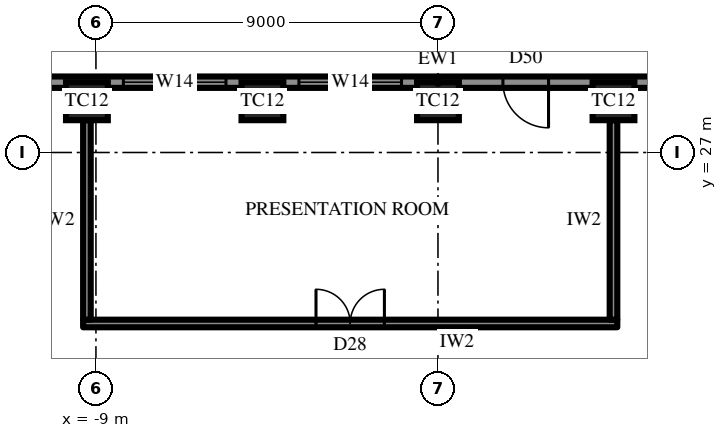
"""IFC4 building model, lengths in metres.
Left out: names, types, materials, properties, quantities, classifications, styles, units other than length and angle.
Written with IfcOpenShell. Run it as: python <this file> out.ifc"""

import sys

from ifc_helpers import new_model, si_unit, direction, frame, frame_2d, origin, origin_2d, place, context, subcontext, project, spatial, rectangle, extrude, element, fill, save


model = new_model("IFC4")
c1 = context("Model", 3, precision=1e-05, world=origin(), true_north=direction((0.0, 1.0)))
c2 = subcontext(c1, "Body", "Model", "MODEL_VIEW")
j1 = project(units=[si_unit("LENGTHUNIT", "METRE"), si_unit("PLANEANGLEUNIT", "RADIAN")], contexts=[c1])
p1 = place(None, origin())
s1 = spatial("IfcSite", under=j1, at=p1, CompositionType="ELEMENT")
p2 = place(p1, origin())
s2 = spatial("IfcBuilding", under=s1, at=p2, CompositionType="ELEMENT")
p3 = place(p2, frame((0.0, 0.0, 278.5)))
s3 = spatial("IfcBuildingStorey", under=s2, at=p3, CompositionType="ELEMENT", Elevation=278.5)
for number, where, z_axis, x_axis in (
    (1, (4.619, 28.35, 0.0), (0.0, 0.0, 1.0), (-1.0, 0.0, 0.0)),
    (2, (0.0, 28.35, 0.0), (0.0, 0.0, 1.0), (-1.0, 0.0, 0.0)),
    (3, (-4.619, 28.35, 0.0), (0.0, 0.0, 1.0), (-1.0, 0.0, 0.0)),
    (4, (-9.238, 28.35, 0.0), (0.0, 0.0, 1.0), (-1.0, 0.0, 0.0)),
):
    element("IfcColumn", number, at=place(p3, frame(where, z_axis=z_axis, x_axis=x_axis)), inside=s3, PredefinedType="COLUMN", context=c2, shape_type="SweptSolid", body=[
        extrude(rectangle(XDim=1.1, YDim=1.0, at=origin_2d()), origin(), (0.0, 0.0, 1.0), 4.2),
    ])
p4 = place(p3, frame((12.556, 28.85, 0.0), z_axis=(0.0, 0.0, 1.0), x_axis=(-1.0, 0.0, 0.0)))
e5 = element("IfcWall", 5, at=p4, inside=s3, PredefinedType="SOLIDWALL", context=c2, shape_type="SweptSolid", body=[
    extrude(rectangle(XDim=25.113, YDim=0.3, at=frame_2d((12.556, 0.0))), origin(), (0.0, 0.0, 1.0), 2.8),
])
p5 = place(p4, frame((4.278, 0.0, 0.6)))
e6 = element("IfcOpeningElement", 6, at=p5, cuts=e5, PredefinedType="OPENING", context=c2, shape_type="SweptSolid", body=[
    extrude(rectangle(XDim=2.7, YDim=1.95, at=frame_2d((1.35, 0.975))), frame((0.0, 0.16, 0.0), z_axis=(0.0, -1.0, 0.0), x_axis=(1.0, 0.0, 0.0)), (0.0, 0.0, 1.0), 0.32),
])
p6 = place(p4, frame((9.647, 0.0, 0.0)))
e7 = element("IfcOpeningElement", 7, at=p6, cuts=e5, PredefinedType="OPENING", context=c2, shape_type="SweptSolid", body=[
    extrude(rectangle(XDim=1.2, YDim=2.4, at=frame_2d((0.6, 1.2))), frame((0.0, 0.16, 0.0), z_axis=(0.0, -1.0, 0.0), x_axis=(1.0, 0.0, 0.0)), (0.0, 0.0, 1.0), 0.32),
])
p7 = place(p4, frame((13.516, 0.0, 0.6)))
e8 = element("IfcOpeningElement", 8, at=p7, cuts=e5, PredefinedType="OPENING", context=c2, shape_type="SweptSolid", body=[
    extrude(rectangle(XDim=2.7, YDim=1.95, at=frame_2d((1.35, 0.975))), frame((0.0, 0.16, 0.0), z_axis=(0.0, -1.0, 0.0), x_axis=(1.0, 0.0, 0.0)), (0.0, 0.0, 1.0), 0.32),
])
p8 = place(p4, frame((18.135, 0.0, 0.6)))
e9 = element("IfcOpeningElement", 9, at=p8, cuts=e5, PredefinedType="OPENING", context=c2, shape_type="SweptSolid", body=[
    extrude(rectangle(XDim=2.7, YDim=1.95, at=frame_2d((1.35, 0.975))), frame((0.0, 0.16, 0.0), z_axis=(0.0, -1.0, 0.0), x_axis=(1.0, 0.0, 0.0)), (0.0, 0.0, 1.0), 0.32),
])
p9 = place(p3, frame((4.719, 22.5, 0.0), z_axis=(0.0, 0.0, 1.0), x_axis=(-1.0, 0.0, 0.0)))
e10 = element("IfcWall", 10, at=p9, inside=s3, PredefinedType="PARTITIONING", context=c2, shape_type="SweptSolid", body=[
    extrude(rectangle(XDim=14.056, YDim=0.2, at=frame_2d((7.028, 0.0))), origin(), (0.0, 0.0, 1.0), 4.0),
])
p10 = place(p9, frame((6.128, 0.0, 0.0)))
e11 = element("IfcOpeningElement", 11, at=p10, cuts=e10, PredefinedType="OPENING", context=c2, shape_type="SweptSolid", body=[
    extrude(rectangle(XDim=1.8, YDim=2.4, at=frame_2d((0.9, 1.2))), frame((0.0, 0.11, 0.0), z_axis=(0.0, -1.0, 0.0), x_axis=(1.0, 0.0, 0.0)), (0.0, 0.0, 1.0), 0.22),
])
for number, where, z_axis, x_axis in (
    (12, (4.619, 22.6, 0.0), (0.0, 0.0, 1.0), (0.0, 1.0, 0.0)),
    (13, (-9.238, 22.6, 0.0), (0.0, 0.0, 1.0), (0.0, 1.0, 0.0)),
):
    element("IfcWall", number, at=place(p3, frame(where, z_axis=z_axis, x_axis=x_axis)), inside=s3, PredefinedType="PARTITIONING", context=c2, shape_type="SweptSolid", body=[
        extrude(rectangle(XDim=5.25, YDim=0.2, at=frame_2d((2.625, 0.0))), origin(), (0.0, 0.0, 1.0), 2.992),
    ])
p11 = place(p6, origin())
e14 = element("IfcDoor", 14, at=p11, inside=s3, OperationType="SINGLE_SWING_RIGHT", PredefinedType="DOOR", context=c2, shape_type="SweptSolid", body=[
    extrude(rectangle(XDim=1.2, YDim=2.4, at=frame_2d((0.6, 1.2))), frame((0.0, 0.025, 0.0), z_axis=(0.0, -1.0, 0.0), x_axis=(1.0, 0.0, 0.0)), (0.0, 0.0, 1.0), 0.05),
])
fill(e7, e14)
p12 = place(p7, origin())
e15 = element("IfcWindow", 15, at=p12, inside=s3, PartitioningType="SINGLE_PANEL", PredefinedType="WINDOW", context=c2, shape_type="SweptSolid", body=[
    extrude(rectangle(XDim=2.7, YDim=1.95, at=frame_2d((1.35, 0.975))), frame((0.0, 0.03, 0.0), z_axis=(0.0, -1.0, 0.0), x_axis=(1.0, 0.0, 0.0)), (0.0, 0.0, 1.0), 0.06),
])
fill(e8, e15)
p13 = place(p8, origin())
e16 = element("IfcWindow", 16, at=p13, inside=s3, PartitioningType="SINGLE_PANEL", PredefinedType="WINDOW", context=c2, shape_type="SweptSolid", body=[
    extrude(rectangle(XDim=2.7, YDim=1.95, at=frame_2d((1.35, 0.975))), frame((0.0, 0.03, 0.0), z_axis=(0.0, -1.0, 0.0), x_axis=(1.0, 0.0, 0.0)), (0.0, 0.0, 1.0), 0.06),
])
fill(e9, e16)
p14 = place(p10, frame((1.8, 0.0, 0.0), z_axis=(0.0, 0.0, 1.0), x_axis=(-1.0, 0.0, 0.0)))
e17 = element("IfcDoor", 17, at=p14, inside=s3, OperationType="DOUBLE_DOOR_SINGLE_SWING", PredefinedType="DOOR", context=c2, shape_type="SweptSolid", body=[
    extrude(rectangle(XDim=1.8, YDim=2.4, at=frame_2d((0.9, 1.2))), frame((0.0, 0.025, 0.0), z_axis=(0.0, -1.0, 0.0), x_axis=(1.0, 0.0, 0.0)), (0.0, 0.0, 1.0), 0.05),
])
fill(e11, e17)
save(model, sys.argv[1])
